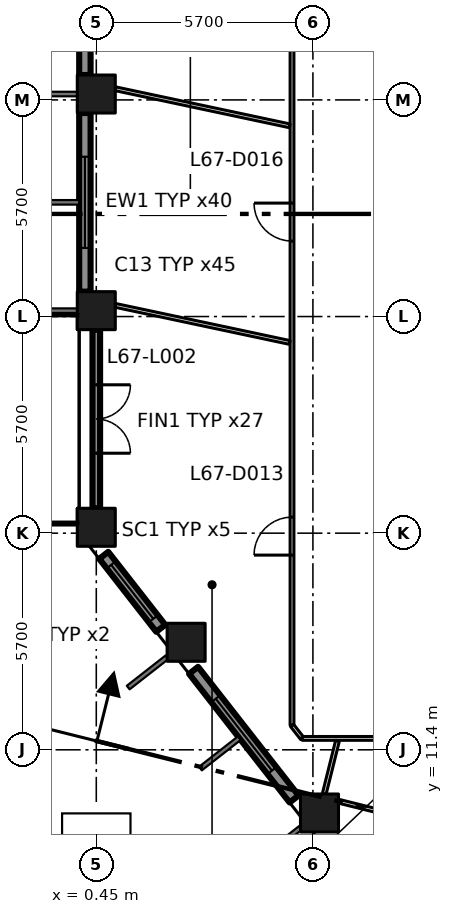
"""IFC4 building model, lengths in metres.
Left out: names, types, materials, properties, quantities, classifications, styles, units other than length and angle.
Written with IfcOpenShell. Run it as: python <this file> out.ifc"""

import sys

from ifc_helpers import new_model, si_unit, direction, frame, frame_2d, origin, origin_2d, place, context, subcontext, project, spatial, rectangle, extrude, element, fill, save


model = new_model("IFC4")
c1 = context("Model", 3, precision=1e-05, world=origin(), true_north=direction((0.0, 1.0)))
c2 = subcontext(c1, "Body", "Model", "MODEL_VIEW")
j1 = project(units=[si_unit("LENGTHUNIT", "METRE"), si_unit("PLANEANGLEUNIT", "RADIAN")], contexts=[c1])
p1 = place(None, origin())
s1 = spatial("IfcSite", under=j1, at=p1, CompositionType="ELEMENT")
p2 = place(p1, origin())
s2 = spatial("IfcBuilding", under=s1, at=p2, CompositionType="ELEMENT")
p3 = place(p2, frame((0.0, 0.0, 294.0)))
s3 = spatial("IfcBuildingStorey", under=s2, at=p3, CompositionType="ELEMENT", Elevation=294.0)
for number, where, z_axis, x_axis in (
    (1, (0.45, 17.255, 0.0), (0.0, 0.0, 1.0), (1.0, 0.0, 0.0)),
    (2, (0.45, 22.955, 0.0), (0.0, 0.0, 1.0), (1.0, 0.0, 0.0)),
    (3, (0.45, 28.655, 0.0), (0.0, 0.0, 1.0), (1.0, 0.0, 0.0)),
    (4, (6.323, 9.737, 0.0), (0.0, 0.0, 1.0), (1.0, 0.0, 0.0)),
    (5, (2.814, 14.229, 0.0), (0.0, 0.0, 1.0), (1.0, 0.0, 0.0)),
):
    element("IfcColumn", number, at=place(p3, frame(where, z_axis=z_axis, x_axis=x_axis)), inside=s3, PredefinedType="COLUMN", context=c2, shape_type="SweptSolid", body=[
        extrude(rectangle(XDim=1.0, YDim=1.0, at=origin_2d()), origin(), (0.0, 0.0, 1.0), 4.2),
    ])
p4 = place(p3, frame((0.15, 33.855, 0.0), z_axis=(0.0, 0.0, 1.0), x_axis=(0.0, -1.0, 0.0)))
e6 = element("IfcWall", 6, at=p4, inside=s3, PredefinedType="SOLIDWALL", context=c2, shape_type="SweptSolid", body=[
    extrude(rectangle(XDim=4.7, YDim=0.3, at=frame_2d((2.35, 0.0))), origin(), (0.0, 0.0, 1.0), 3.2),
])
p5 = place(p4, frame((1.15, 0.0, 0.8)))
e7 = element("IfcOpeningElement", 7, at=p5, cuts=e6, PredefinedType="OPENING", context=c2, shape_type="SweptSolid", body=[
    extrude(rectangle(XDim=2.4, YDim=2.1, at=frame_2d((1.2, 1.05))), frame((0.0, 0.16, 0.0), z_axis=(0.0, -1.0, 0.0), x_axis=(1.0, 0.0, 0.0)), (0.0, 0.0, 1.0), 0.32),
])
p6 = place(p3, frame((0.15, 28.155, 0.0), z_axis=(0.0, 0.0, 1.0), x_axis=(0.0, -1.0, 0.0)))
e8 = element("IfcWall", 8, at=p6, inside=s3, PredefinedType="SOLIDWALL", context=c2, shape_type="SweptSolid", body=[
    extrude(rectangle(XDim=4.7, YDim=0.3, at=frame_2d((2.35, 0.0))), origin(), (0.0, 0.0, 1.0), 3.2),
])
p7 = place(p6, frame((1.15, 0.0, 0.8)))
e9 = element("IfcOpeningElement", 9, at=p7, cuts=e8, PredefinedType="OPENING", context=c2, shape_type="SweptSolid", body=[
    extrude(rectangle(XDim=2.4, YDim=2.1, at=frame_2d((1.2, 1.05))), frame((0.0, 0.16, 0.0), z_axis=(0.0, -1.0, 0.0), x_axis=(1.0, 0.0, 0.0)), (0.0, 0.0, 1.0), 0.32),
])
p8 = place(p3, frame((0.45, 22.454, 0.0), z_axis=(0.0, 0.0, 1.0), x_axis=(0.0, -1.0, 0.0)))
e10 = element("IfcWall", 10, at=p8, inside=s3, PredefinedType="SOLIDWALL", context=c2, shape_type="SweptSolid", body=[
    extrude(rectangle(XDim=4.699, YDim=0.2, at=frame_2d((2.35, 0.0))), origin(), (0.0, 0.0, 1.0), 3.2),
])
p9 = place(p8, frame((1.45, 0.0, 0.0)))
e11 = element("IfcOpeningElement", 11, at=p9, cuts=e10, PredefinedType="OPENING", context=c2, shape_type="SweptSolid", body=[
    extrude(rectangle(XDim=1.8, YDim=2.9, at=frame_2d((0.9, 1.45))), frame((0.0, 0.11, 0.0), z_axis=(0.0, -1.0, 0.0), x_axis=(1.0, 0.0, 0.0)), (0.0, 0.0, 1.0), 0.22),
])
p10 = place(p3, frame((-0.88, 22.785, 0.0), z_axis=(0.0, 0.0, 1.0), x_axis=(0.0, -1.0, 0.0)))
e12 = element("IfcWall", 12, at=p10, inside=s3, PredefinedType="SOLIDWALL", context=c2, shape_type="SweptSolid", body=[
    extrude(rectangle(XDim=5.36, YDim=0.4, at=frame_2d((2.68, 0.0))), origin(), (0.0, 0.0, 1.0), 0.3),
])
p11 = place(p3, frame((0.646, 16.517, 0.0), z_axis=(0.0, 0.0, 1.0), x_axis=(0.615610986717, -0.788050197026, 0.0)))
e13 = element("IfcWall", 13, at=p11, inside=s3, PredefinedType="SOLIDWALL", context=c2, shape_type="SweptSolid", body=[
    extrude(rectangle(XDim=2.437, YDim=0.3, at=frame_2d((1.218, 0.0))), origin(), (0.0, 0.0, 1.0), 3.2),
])
p12 = place(p11, frame((0.318, 0.0, 0.8)))
e14 = element("IfcOpeningElement", 14, at=p12, cuts=e13, PredefinedType="OPENING", context=c2, shape_type="SweptSolid", body=[
    extrude(rectangle(XDim=1.8, YDim=2.1, at=frame_2d((0.9, 1.05))), frame((0.0, 0.16, 0.0), z_axis=(0.0, -1.0, 0.0), x_axis=(1.0, 0.0, 0.0)), (0.0, 0.0, 1.0), 0.32),
])
p13 = place(p3, frame((3.01, 13.491, 0.0), z_axis=(0.0, 0.0, 1.0), x_axis=(0.615713519567, -0.787970089421, 0.0)))
e15 = element("IfcWall", 15, at=p13, inside=s3, PredefinedType="SOLIDWALL", context=c2, shape_type="SweptSolid", body=[
    extrude(rectangle(XDim=4.296, YDim=0.3, at=frame_2d((2.148, 0.0))), origin(), (0.0, 0.0, 1.0), 3.2),
])
p14 = place(p13, frame((0.948, 0.0, 0.8)))
e16 = element("IfcOpeningElement", 16, at=p14, cuts=e15, PredefinedType="OPENING", context=c2, shape_type="SweptSolid", body=[
    extrude(rectangle(XDim=2.4, YDim=2.1, at=frame_2d((1.2, 1.05))), frame((0.0, 0.16, 0.0), z_axis=(0.0, -1.0, 0.0), x_axis=(1.0, 0.0, 0.0)), (0.0, 0.0, 1.0), 0.32),
])
p15 = place(p3, frame((5.6, 12.043, 0.0), z_axis=(0.0, 0.0, 1.0), x_axis=(0.0, 1.0, 0.0)))
e17 = element("IfcWall", 17, at=p15, inside=s3, PredefinedType="PARTITIONING", context=c2, shape_type="SweptSolid", body=[
    extrude(rectangle(XDim=27.162, YDim=0.1, at=frame_2d((13.581, 0.0))), origin(), (0.0, 0.0, 1.0), 3.9),
])
p16 = place(p15, frame((4.48, 0.0, 0.0)))
e18 = element("IfcOpeningElement", 18, at=p16, cuts=e17, PredefinedType="OPENING", context=c2, shape_type="SweptSolid", body=[
    extrude(rectangle(XDim=1.0, YDim=2.1, at=frame_2d((0.5, 1.05))), frame((0.0, 0.06, 0.0), z_axis=(0.0, -1.0, 0.0), x_axis=(1.0, 0.0, 0.0)), (0.0, 0.0, 1.0), 0.12),
])
p17 = place(p15, frame((12.742, 0.0, 0.0)))
e19 = element("IfcOpeningElement", 19, at=p17, cuts=e17, PredefinedType="OPENING", context=c2, shape_type="SweptSolid", body=[
    extrude(rectangle(XDim=1.0, YDim=2.1, at=frame_2d((0.5, 1.05))), frame((0.0, 0.06, 0.0), z_axis=(0.0, -1.0, 0.0), x_axis=(1.0, 0.0, 0.0)), (0.0, 0.0, 1.0), 0.12),
])
p18 = place(p15, frame((21.142, 0.0, 0.0)))
e20 = element("IfcOpeningElement", 20, at=p18, cuts=e17, PredefinedType="OPENING", context=c2, shape_type="SweptSolid", body=[
    extrude(rectangle(XDim=1.0, YDim=2.1, at=frame_2d((0.5, 1.05))), frame((0.0, 0.06, 0.0), z_axis=(0.0, -1.0, 0.0), x_axis=(1.0, 0.0, 0.0)), (0.0, 0.0, 1.0), 0.12),
])
p19 = place(p3, frame((5.6, 12.043, 0.0), z_axis=(0.0, 0.0, 1.0), x_axis=(0.615415398102, -0.788202948344, 0.0)))
e21 = element("IfcWall", 21, at=p19, inside=s3, PredefinedType="PARTITIONING", context=c2, shape_type="SweptSolid", body=[
    extrude(rectangle(XDim=0.435, YDim=0.1, at=frame_2d((0.218, 0.0))), origin(), (0.0, 0.0, 1.0), 3.9),
])
p20 = place(p3, frame((5.868, 11.7, 0.0), z_axis=(0.0, 0.0, 1.0), x_axis=(1.0, 0.0, 0.0)))
e22 = element("IfcWall", 22, at=p20, inside=s3, PredefinedType="PARTITIONING", context=c2, shape_type="SweptSolid", body=[
    extrude(rectangle(XDim=4.032, YDim=0.1, at=frame_2d((2.016, 0.0))), origin(), (0.0, 0.0, 1.0), 3.9),
])
for number, where, z_axis, x_axis in (
    (23, (5.54, 22.118, 0.0), (0.0, 0.0, 1.0), (-0.978, 0.208, 0.0)),
    (24, (5.54, 27.818, 0.0), (0.0, 0.0, 1.0), (-0.978, 0.208, 0.0)),
):
    element("IfcWall", number, at=place(p3, frame(where, z_axis=z_axis, x_axis=x_axis)), inside=s3, PredefinedType="PARTITIONING", context=c2, shape_type="SweptSolid", body=[
        extrude(rectangle(XDim=4.693, YDim=0.1, at=frame_2d((2.346, 0.0))), origin(), (0.0, 0.0, 1.0), 3.9),
    ])
p21 = place(p3, frame((6.797, 11.638, 0.0), z_axis=(0.0, 0.0, 1.0), x_axis=(-0.242456058691, -0.970162388265, 0.0)))
e25 = element("IfcWall", 25, at=p21, inside=s3, PredefinedType="PARTITIONING", context=c2, shape_type="SweptSolid", body=[
    extrude(rectangle(XDim=1.444, YDim=0.1, at=frame_2d((0.722, 0.0))), origin(), (0.0, 0.0, 1.0), 3.9),
])
p22 = place(p3, frame((8.72, 9.575, 0.0), z_axis=(0.0, 0.0, 1.0), x_axis=(-0.970274576003, 0.242006708918, 0.0)))
e26 = element("IfcWall", 26, at=p22, inside=s3, PredefinedType="PARTITIONING", context=c2, shape_type="SweptSolid", body=[
    extrude(rectangle(XDim=1.955, YDim=0.1, at=frame_2d((0.978, 0.0))), origin(), (0.0, 0.0, 1.0), 3.9),
])
p23 = place(p7, origin())
e27 = element("IfcWindow", 27, at=p23, inside=s3, PartitioningType="DOUBLE_PANEL_VERTICAL", PredefinedType="WINDOW", context=c2, shape_type="SweptSolid", body=[
    extrude(rectangle(XDim=2.4, YDim=2.1, at=frame_2d((1.2, 1.05))), frame((0.0, 0.03, 0.0), z_axis=(0.0, -1.0, 0.0), x_axis=(1.0, 0.0, 0.0)), (0.0, 0.0, 1.0), 0.06),
])
fill(e9, e27)
p24 = place(p9, origin())
e28 = element("IfcDoor", 28, at=p24, inside=s3, OperationType="DOUBLE_DOOR_SINGLE_SWING", PredefinedType="DOOR", context=c2, shape_type="SweptSolid", body=[
    extrude(rectangle(XDim=1.8, YDim=2.9, at=frame_2d((0.9, 1.45))), frame((0.0, 0.025, 0.0), z_axis=(0.0, -1.0, 0.0), x_axis=(1.0, 0.0, 0.0)), (0.0, 0.0, 1.0), 0.05),
])
fill(e11, e28)
p25 = place(p12, origin())
e29 = element("IfcWindow", 29, at=p25, inside=s3, PartitioningType="DOUBLE_PANEL_VERTICAL", PredefinedType="WINDOW", context=c2, shape_type="SweptSolid", body=[
    extrude(rectangle(XDim=1.8, YDim=2.1, at=frame_2d((0.9, 1.05))), frame((0.0, 0.03, 0.0), z_axis=(0.0, -1.0, 0.0), x_axis=(1.0, 0.0, 0.0)), (0.0, 0.0, 1.0), 0.06),
])
fill(e14, e29)
p26 = place(p14, origin())
e30 = element("IfcWindow", 30, at=p26, inside=s3, PartitioningType="DOUBLE_PANEL_VERTICAL", PredefinedType="WINDOW", context=c2, shape_type="SweptSolid", body=[
    extrude(rectangle(XDim=2.4, YDim=2.1, at=frame_2d((1.2, 1.05))), frame((0.0, 0.03, 0.0), z_axis=(0.0, -1.0, 0.0), x_axis=(1.0, 0.0, 0.0)), (0.0, 0.0, 1.0), 0.06),
])
fill(e16, e30)
p27 = place(p16, origin())
e31 = element("IfcDoor", 31, at=p27, inside=s3, OperationType="SINGLE_SWING_LEFT", PredefinedType="DOOR", context=c2, shape_type="SweptSolid", body=[
    extrude(rectangle(XDim=1.0, YDim=2.1, at=frame_2d((0.5, 1.05))), frame((0.0, 0.025, 0.0), z_axis=(0.0, -1.0, 0.0), x_axis=(1.0, 0.0, 0.0)), (0.0, 0.0, 1.0), 0.05),
])
fill(e18, e31)
p28 = place(p17, origin())
e32 = element("IfcDoor", 32, at=p28, inside=s3, OperationType="SINGLE_SWING_RIGHT", PredefinedType="DOOR", context=c2, shape_type="SweptSolid", body=[
    extrude(rectangle(XDim=1.0, YDim=2.1, at=frame_2d((0.5, 1.05))), frame((0.0, 0.025, 0.0), z_axis=(0.0, -1.0, 0.0), x_axis=(1.0, 0.0, 0.0)), (0.0, 0.0, 1.0), 0.05),
])
fill(e19, e32)
save(model, sys.argv[1])
